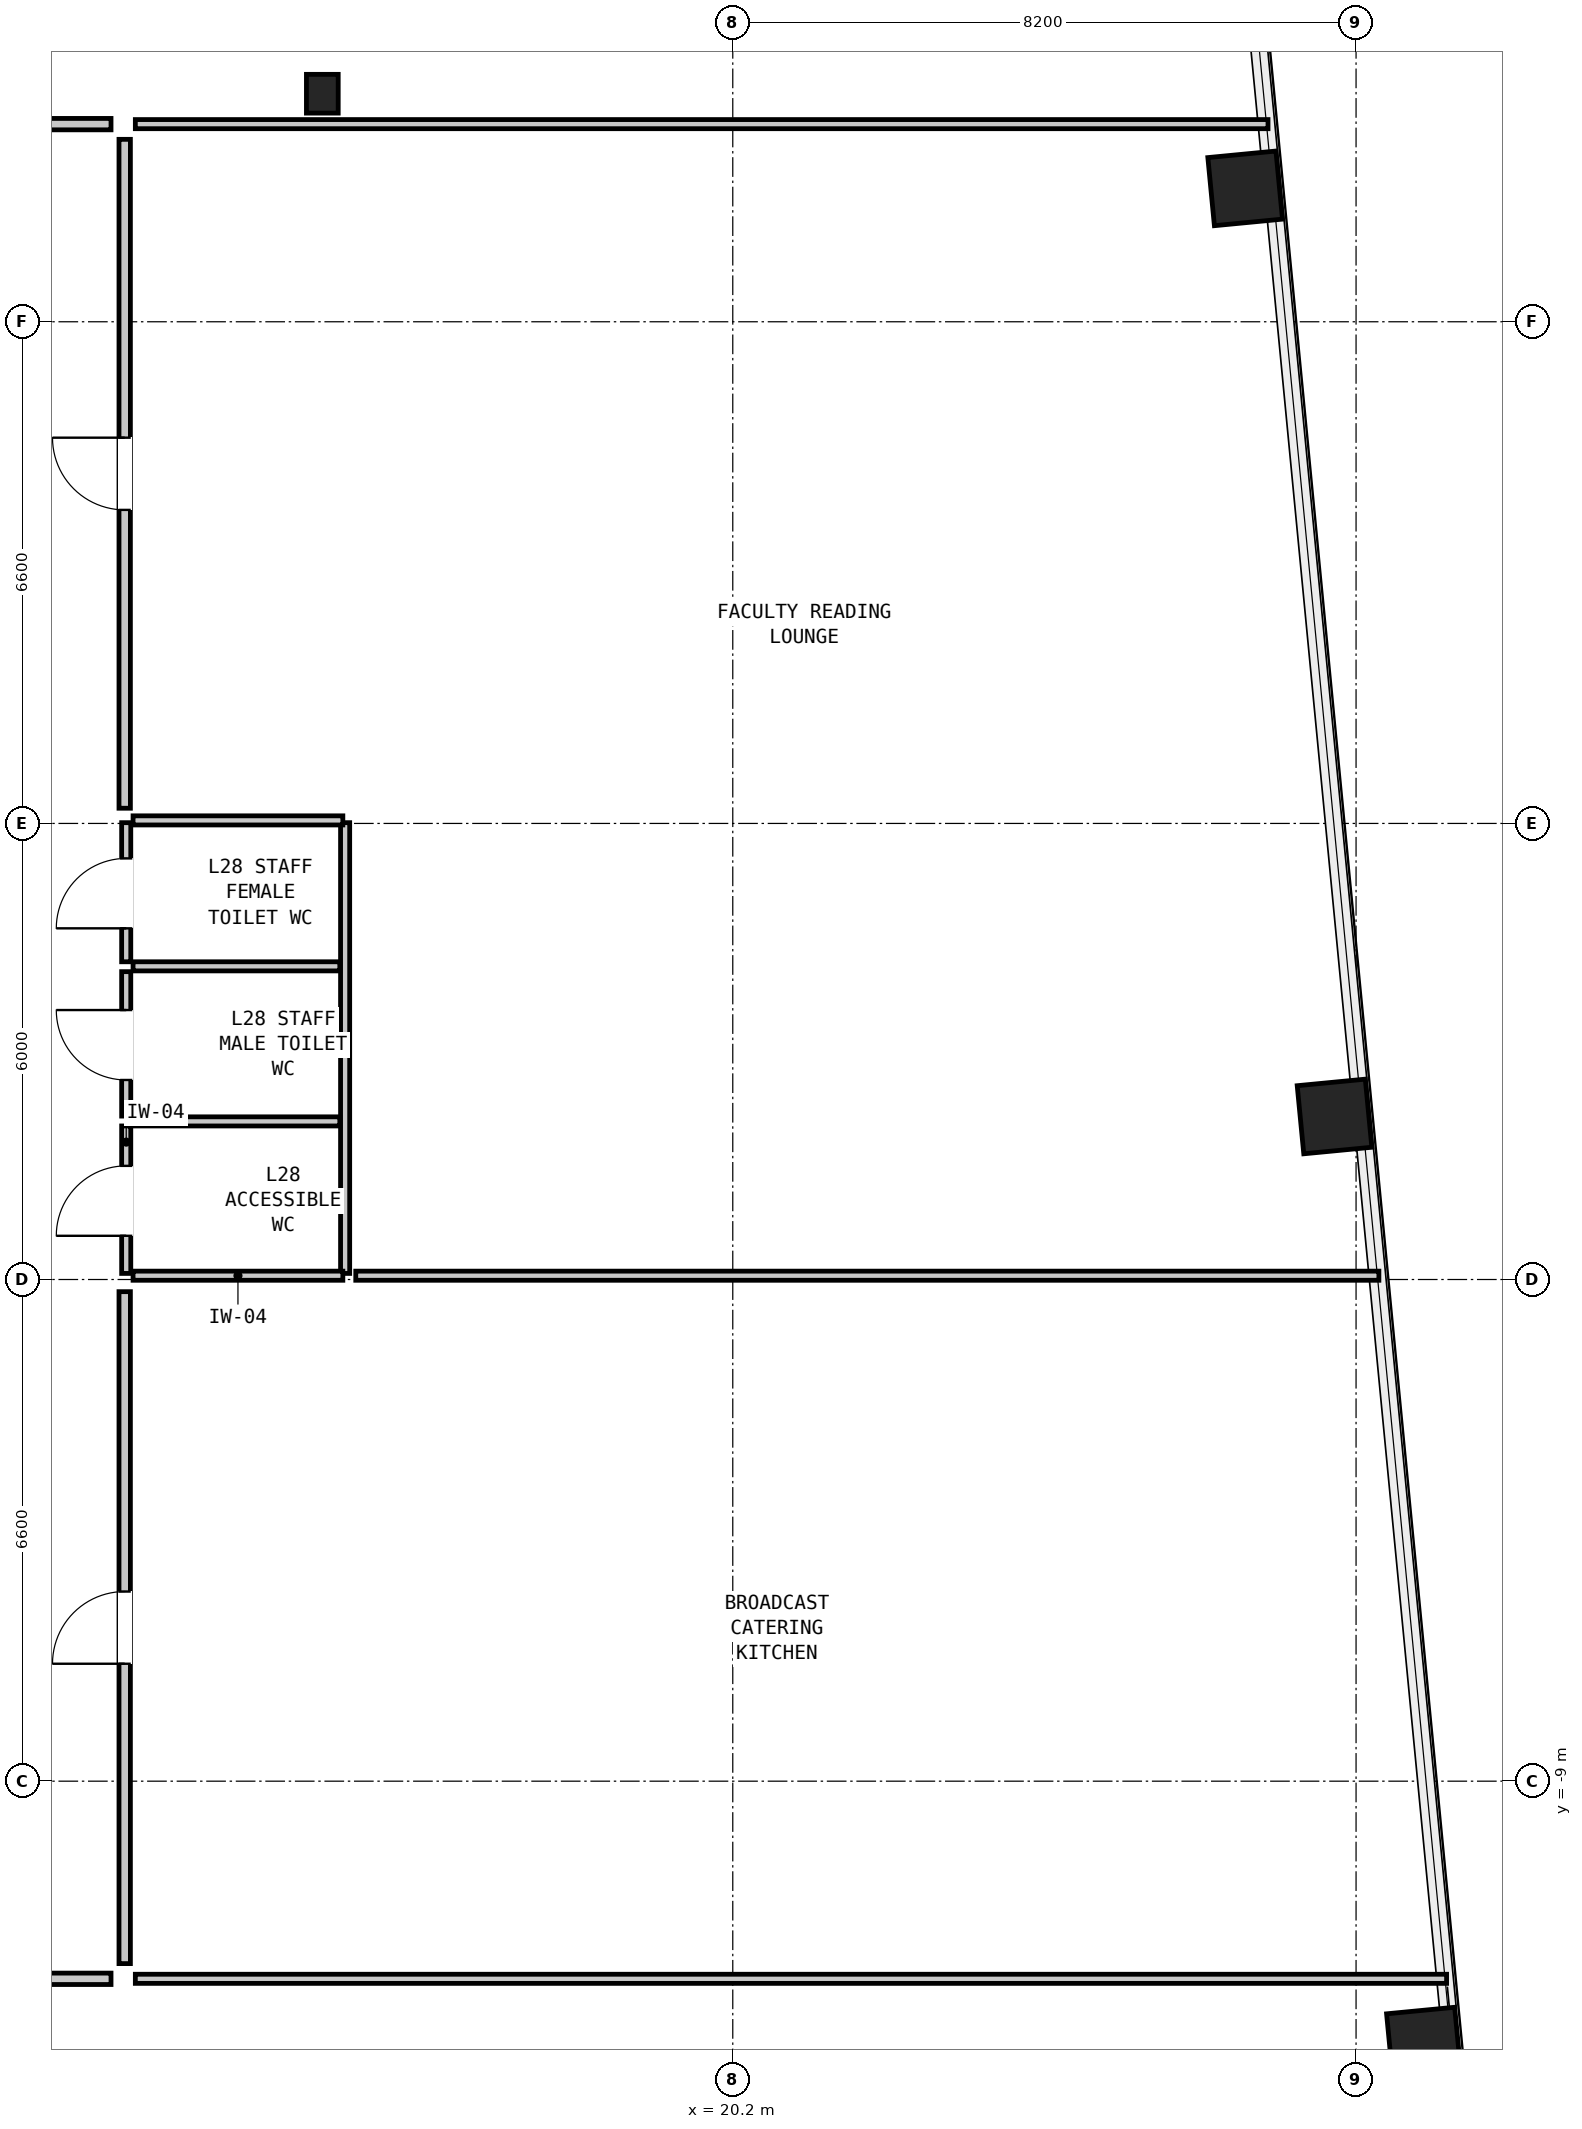
"""IFC4 building model, lengths in metres.
Left out: names, types, materials, properties, quantities, classifications, styles, units other than length and angle.
Written with IfcOpenShell. Run it as: python <this file> out.ifc"""

import sys

from ifc_helpers import new_model, si_unit, direction, frame, frame_2d, origin, origin_2d, place, context, subcontext, project, spatial, rectangle, hollow_rectangle, i_section, extrude, element, fill, save


model = new_model("IFC4")
c1 = context("Model", 3, precision=1e-05, world=origin(), true_north=direction((0.0, 1.0)))
c2 = subcontext(c1, "Body", "Model", "MODEL_VIEW")
j1 = project(units=[si_unit("LENGTHUNIT", "METRE"), si_unit("PLANEANGLEUNIT", "RADIAN")], contexts=[c1])
p1 = place(None, origin())
s1 = spatial("IfcSite", under=j1, at=p1, CompositionType="ELEMENT")
p2 = place(p1, origin())
s2 = spatial("IfcBuilding", under=s1, at=p2, CompositionType="ELEMENT")
p3 = place(p2, frame((0.0, 0.0, 96.9)))
s3 = spatial("IfcBuildingStorey", under=s2, at=p3, CompositionType="ELEMENT", Elevation=96.9)
for number, where, z_axis, x_axis in (
    (1, (29.292, -12.465, 0.0), (0.0, 0.0, 1.0), (-0.096, 0.995, 0.0)),
    (2, (28.117, -0.255, 0.0), (0.0, 0.0, 1.0), (-0.096, 0.995, 0.0)),
    (3, (26.941, 11.955, 0.0), (0.0, 0.0, 1.0), (-0.096, 0.995, 0.0)),
):
    element("IfcColumn", number, at=place(p3, frame(where, z_axis=z_axis, x_axis=x_axis)), inside=s3, PredefinedType="COLUMN", context=c2, shape_type="SweptSolid", body=[
        extrude(hollow_rectangle(XDim=0.9, YDim=0.9, WallThickness=0.055, at=origin_2d()), origin(), (0.0, 0.0, 1.0), 4.35),
    ])
p4 = place(p3, frame((14.8, 13.2, 0.0), z_axis=(0.0, 0.0, 1.0), x_axis=(1.0, 0.0, 0.0)))
e4 = element("IfcColumn", 4, at=p4, inside=s3, PredefinedType="COLUMN", context=c2, shape_type="SweptSolid", body=[
    extrude(i_section(OverallWidth=0.418, OverallDepth=0.51, WebThickness=0.042, FlangeThickness=0.068, at=origin_2d()), origin(), (0.0, 0.0, 1.0), 4.35),
])
p5 = place(p3, frame((12.22, -2.32, 0.0), z_axis=(0.0, 0.0, 1.0), x_axis=(0.0, 1.0, 0.0)))
e5 = element("IfcWall", 5, at=p5, inside=s3, PredefinedType="PARTITIONING", context=c2, shape_type="SweptSolid", body=[
    extrude(rectangle(XDim=1.94, YDim=0.12, at=frame_2d((0.97, 0.0))), origin(), (0.0, 0.0, 1.0), 4.07),
])
p6 = place(p5, frame((0.495, 0.0, 0.0)))
e6 = element("IfcOpeningElement", 6, at=p6, cuts=e5, PredefinedType="OPENING", context=c2, shape_type="SweptSolid", body=[
    extrude(rectangle(XDim=0.92, YDim=2.1, at=frame_2d((0.46, 1.05))), frame((0.0, 0.072, 0.0), z_axis=(0.0, -1.0, 0.0), x_axis=(1.0, 0.0, 0.0)), (0.0, 0.0, 1.0), 0.144),
])
p7 = place(p3, frame((12.22, -0.25, 0.0), z_axis=(0.0, 0.0, 1.0), x_axis=(0.0, 1.0, 0.0)))
e7 = element("IfcWall", 7, at=p7, inside=s3, PredefinedType="PARTITIONING", context=c2, shape_type="SweptSolid", body=[
    extrude(rectangle(XDim=1.9, YDim=0.12, at=frame_2d((0.95, 0.0))), origin(), (0.0, 0.0, 1.0), 4.07),
])
p8 = place(p7, frame((0.475, 0.0, 0.0)))
e8 = element("IfcOpeningElement", 8, at=p8, cuts=e7, PredefinedType="OPENING", context=c2, shape_type="SweptSolid", body=[
    extrude(rectangle(XDim=0.92, YDim=2.1, at=frame_2d((0.46, 1.05))), frame((0.0, 0.072, 0.0), z_axis=(0.0, -1.0, 0.0), x_axis=(1.0, 0.0, 0.0)), (0.0, 0.0, 1.0), 0.144),
])
p9 = place(p3, frame((12.22, 1.78, 0.0), z_axis=(0.0, 0.0, 1.0), x_axis=(0.0, 1.0, 0.0)))
e9 = element("IfcWall", 9, at=p9, inside=s3, PredefinedType="PARTITIONING", context=c2, shape_type="SweptSolid", body=[
    extrude(rectangle(XDim=1.83, YDim=0.12, at=frame_2d((0.915, 0.0))), origin(), (0.0, 0.0, 1.0), 4.07),
])
p10 = place(p9, frame((0.44, 0.0, 0.0)))
e10 = element("IfcOpeningElement", 10, at=p10, cuts=e9, PredefinedType="OPENING", context=c2, shape_type="SweptSolid", body=[
    extrude(rectangle(XDim=0.92, YDim=2.1, at=frame_2d((0.46, 1.05))), frame((0.0, 0.072, 0.0), z_axis=(0.0, -1.0, 0.0), x_axis=(1.0, 0.0, 0.0)), (0.0, 0.0, 1.0), 0.144),
])
p11 = place(p3, frame((15.1, -2.32, 0.0), z_axis=(0.0, 0.0, 1.0), x_axis=(0.0, 1.0, 0.0)))
e11 = element("IfcWall", 11, at=p11, inside=s3, PredefinedType="PARTITIONING", context=c2, shape_type="SweptSolid", body=[
    extrude(rectangle(XDim=5.93, YDim=0.12, at=frame_2d((2.965, 0.0))), origin(), (0.0, 0.0, 1.0), 4.07),
])
for number, where, z_axis, x_axis in (
    (12, (12.31, -2.35, 0.0), (0.0, 0.0, 1.0), (1.0, 0.0, 0.0)),
    (13, (12.31, 3.64, 0.0), (0.0, 0.0, 1.0), (1.0, 0.0, 0.0)),
):
    element("IfcWall", number, at=place(p3, frame(where, z_axis=z_axis, x_axis=x_axis)), inside=s3, PredefinedType="PARTITIONING", context=c2, shape_type="SweptSolid", body=[
        extrude(rectangle(XDim=2.76, YDim=0.12, at=frame_2d((1.38, 0.0))), origin(), (0.0, 0.0, 1.0), 2.25),
    ])
for number, where, z_axis, x_axis in (
    (14, (12.31, -0.32, 0.0), (0.0, 0.0, 1.0), (1.0, 0.0, 0.0)),
    (15, (12.31, 1.72, 0.0), (0.0, 0.0, 1.0), (1.0, 0.0, 0.0)),
):
    element("IfcWall", number, at=place(p3, frame(where, z_axis=z_axis, x_axis=x_axis)), inside=s3, PredefinedType="PARTITIONING", context=c2, shape_type="SweptSolid", body=[
        extrude(rectangle(XDim=2.72, YDim=0.12, at=frame_2d((1.36, 0.0))), origin(), (0.0, 0.0, 1.0), 4.07),
    ])
p12 = place(p3, frame((12.34, 12.8, 0.0), z_axis=(0.0, 0.0, 1.0), x_axis=(1.0, 0.0, 0.0)))
e16 = element("IfcWall", 16, at=p12, inside=s3, PredefinedType="PARTITIONING", context=c2, shape_type="SweptSolid", body=[
    extrude(rectangle(XDim=14.902, YDim=0.12, at=frame_2d((7.451, 0.0))), origin(), (0.0, 0.0, 1.0), 4.07),
])
p13 = place(p3, frame((12.34, -11.6, 0.0), z_axis=(0.0, 0.0, 1.0), x_axis=(1.0, 0.0, 0.0)))
e17 = element("IfcWall", 17, at=p13, inside=s3, PredefinedType="PARTITIONING", context=c2, shape_type="SweptSolid", body=[
    extrude(rectangle(XDim=17.251, YDim=0.12, at=frame_2d((8.625, 0.0))), origin(), (0.0, 0.0, 1.0), 3.288),
])
p14 = place(p3, frame((15.24, -2.35, 0.0), z_axis=(0.0, 0.0, 1.0), x_axis=(1.0, 0.0, 0.0)))
e18 = element("IfcWall", 18, at=p14, inside=s3, PredefinedType="PARTITIONING", context=c2, shape_type="SweptSolid", body=[
    extrude(rectangle(XDim=13.46, YDim=0.12, at=frame_2d((6.73, 0.0))), origin(), (0.0, 0.0, 1.0), 2.25),
])
p15 = place(p3, frame((5.58, 12.8, 0.0), z_axis=(0.0, 0.0, 1.0), x_axis=(1.0, 0.0, 0.0)))
e19 = element("IfcWall", 19, at=p15, inside=s3, PredefinedType="PARTITIONING", context=c2, shape_type="SweptSolid", body=[
    extrude(rectangle(XDim=6.44, YDim=0.15, at=frame_2d((3.22, 0.0))), origin(), (0.0, 0.0, 1.0), 4.07),
])
p16 = place(p15, frame((2.62, 0.0, 0.0)))
e20 = element("IfcOpeningElement", 20, at=p16, cuts=e19, PredefinedType="OPENING", context=c2, shape_type="SweptSolid", body=[
    extrude(rectangle(XDim=1.2, YDim=2.1, at=frame_2d((0.6, 1.05))), frame((0.0, 0.087, 0.0), z_axis=(0.0, -1.0, 0.0), x_axis=(1.0, 0.0, 0.0)), (0.0, 0.0, 1.0), 0.174),
])
p17 = place(p3, frame((0.18, -11.6, 0.0), z_axis=(0.0, 0.0, 1.0), x_axis=(1.0, 0.0, 0.0)))
e21 = element("IfcWall", 21, at=p17, inside=s3, PredefinedType="PARTITIONING", context=c2, shape_type="SweptSolid", body=[
    extrude(rectangle(XDim=11.84, YDim=0.15, at=frame_2d((5.92, 0.0))), origin(), (0.0, 0.0, 1.0), 3.288),
])
p18 = place(p17, frame((5.32, 0.0, 0.0)))
e22 = element("IfcOpeningElement", 22, at=p18, cuts=e21, PredefinedType="OPENING", context=c2, shape_type="SweptSolid", body=[
    extrude(rectangle(XDim=1.2, YDim=2.1, at=frame_2d((0.6, 1.05))), frame((0.0, 0.087, 0.0), z_axis=(0.0, -1.0, 0.0), x_axis=(1.0, 0.0, 0.0)), (0.0, 0.0, 1.0), 0.174),
])
p19 = place(p3, frame((12.2, -11.4, 0.0), z_axis=(0.0, 0.0, 1.0), x_axis=(0.0, 1.0, 0.0)))
e23 = element("IfcWall", 23, at=p19, inside=s3, PredefinedType="PARTITIONING", context=c2, shape_type="SweptSolid", body=[
    extrude(rectangle(XDim=8.84, YDim=0.15, at=frame_2d((4.42, 0.0))), origin(), (0.0, 0.0, 1.0), 4.07),
])
p20 = place(p19, frame((3.945, 0.0, 0.0)))
e24 = element("IfcOpeningElement", 24, at=p20, cuts=e23, PredefinedType="OPENING", context=c2, shape_type="SweptSolid", body=[
    extrude(rectangle(XDim=0.95, YDim=2.1, at=frame_2d((0.475, 1.05))), frame((0.0, 0.087, 0.0), z_axis=(0.0, -1.0, 0.0), x_axis=(1.0, 0.0, 0.0)), (0.0, 0.0, 1.0), 0.174),
])
p21 = place(p3, frame((12.2, 3.8, 0.0), z_axis=(0.0, 0.0, 1.0), x_axis=(0.0, 1.0, 0.0)))
e25 = element("IfcWall", 25, at=p21, inside=s3, PredefinedType="PARTITIONING", context=c2, shape_type="SweptSolid", body=[
    extrude(rectangle(XDim=8.8, YDim=0.15, at=frame_2d((4.4, 0.0))), origin(), (0.0, 0.0, 1.0), 4.07),
])
p22 = place(p21, frame((3.925, 0.0, 0.0)))
e26 = element("IfcOpeningElement", 26, at=p22, cuts=e25, PredefinedType="OPENING", context=c2, shape_type="SweptSolid", body=[
    extrude(rectangle(XDim=0.95, YDim=2.1, at=frame_2d((0.475, 1.05))), frame((0.0, 0.087, 0.0), z_axis=(0.0, -1.0, 0.0), x_axis=(1.0, 0.0, 0.0)), (0.0, 0.0, 1.0), 0.174),
])
p23 = place(p6, origin())
e27 = element("IfcDoor", 27, at=p23, inside=s3, OperationType="SINGLE_SWING_LEFT", PredefinedType="DOOR", context=c2, shape_type="SweptSolid", body=[
    extrude(rectangle(XDim=0.92, YDim=2.1, at=frame_2d((0.46, 1.05))), frame((0.0, 0.025, 0.0), z_axis=(0.0, -1.0, 0.0), x_axis=(1.0, 0.0, 0.0)), (0.0, 0.0, 1.0), 0.05),
])
fill(e6, e27)
p24 = place(p8, origin())
e28 = element("IfcDoor", 28, at=p24, inside=s3, OperationType="SINGLE_SWING_RIGHT", PredefinedType="DOOR", context=c2, shape_type="SweptSolid", body=[
    extrude(rectangle(XDim=0.92, YDim=2.1, at=frame_2d((0.46, 1.05))), frame((0.0, 0.025, 0.0), z_axis=(0.0, -1.0, 0.0), x_axis=(1.0, 0.0, 0.0)), (0.0, 0.0, 1.0), 0.05),
])
fill(e8, e28)
p25 = place(p10, origin())
e29 = element("IfcDoor", 29, at=p25, inside=s3, OperationType="SINGLE_SWING_LEFT", PredefinedType="DOOR", context=c2, shape_type="SweptSolid", body=[
    extrude(rectangle(XDim=0.92, YDim=2.1, at=frame_2d((0.46, 1.05))), frame((0.0, 0.025, 0.0), z_axis=(0.0, -1.0, 0.0), x_axis=(1.0, 0.0, 0.0)), (0.0, 0.0, 1.0), 0.05),
])
fill(e10, e29)
p26 = place(p20, origin())
e30 = element("IfcDoor", 30, at=p26, inside=s3, OperationType="SINGLE_SWING_LEFT", PredefinedType="DOOR", context=c2, shape_type="SweptSolid", body=[
    extrude(rectangle(XDim=0.95, YDim=2.1, at=frame_2d((0.475, 1.05))), frame((0.0, 0.025, 0.0), z_axis=(0.0, -1.0, 0.0), x_axis=(1.0, 0.0, 0.0)), (0.0, 0.0, 1.0), 0.05),
])
fill(e24, e30)
p27 = place(p22, origin())
e31 = element("IfcDoor", 31, at=p27, inside=s3, OperationType="SINGLE_SWING_RIGHT", PredefinedType="DOOR", context=c2, shape_type="SweptSolid", body=[
    extrude(rectangle(XDim=0.95, YDim=2.1, at=frame_2d((0.475, 1.05))), frame((0.0, 0.025, 0.0), z_axis=(0.0, -1.0, 0.0), x_axis=(1.0, 0.0, 0.0)), (0.0, 0.0, 1.0), 0.05),
])
fill(e26, e31)
save(model, sys.argv[1])
